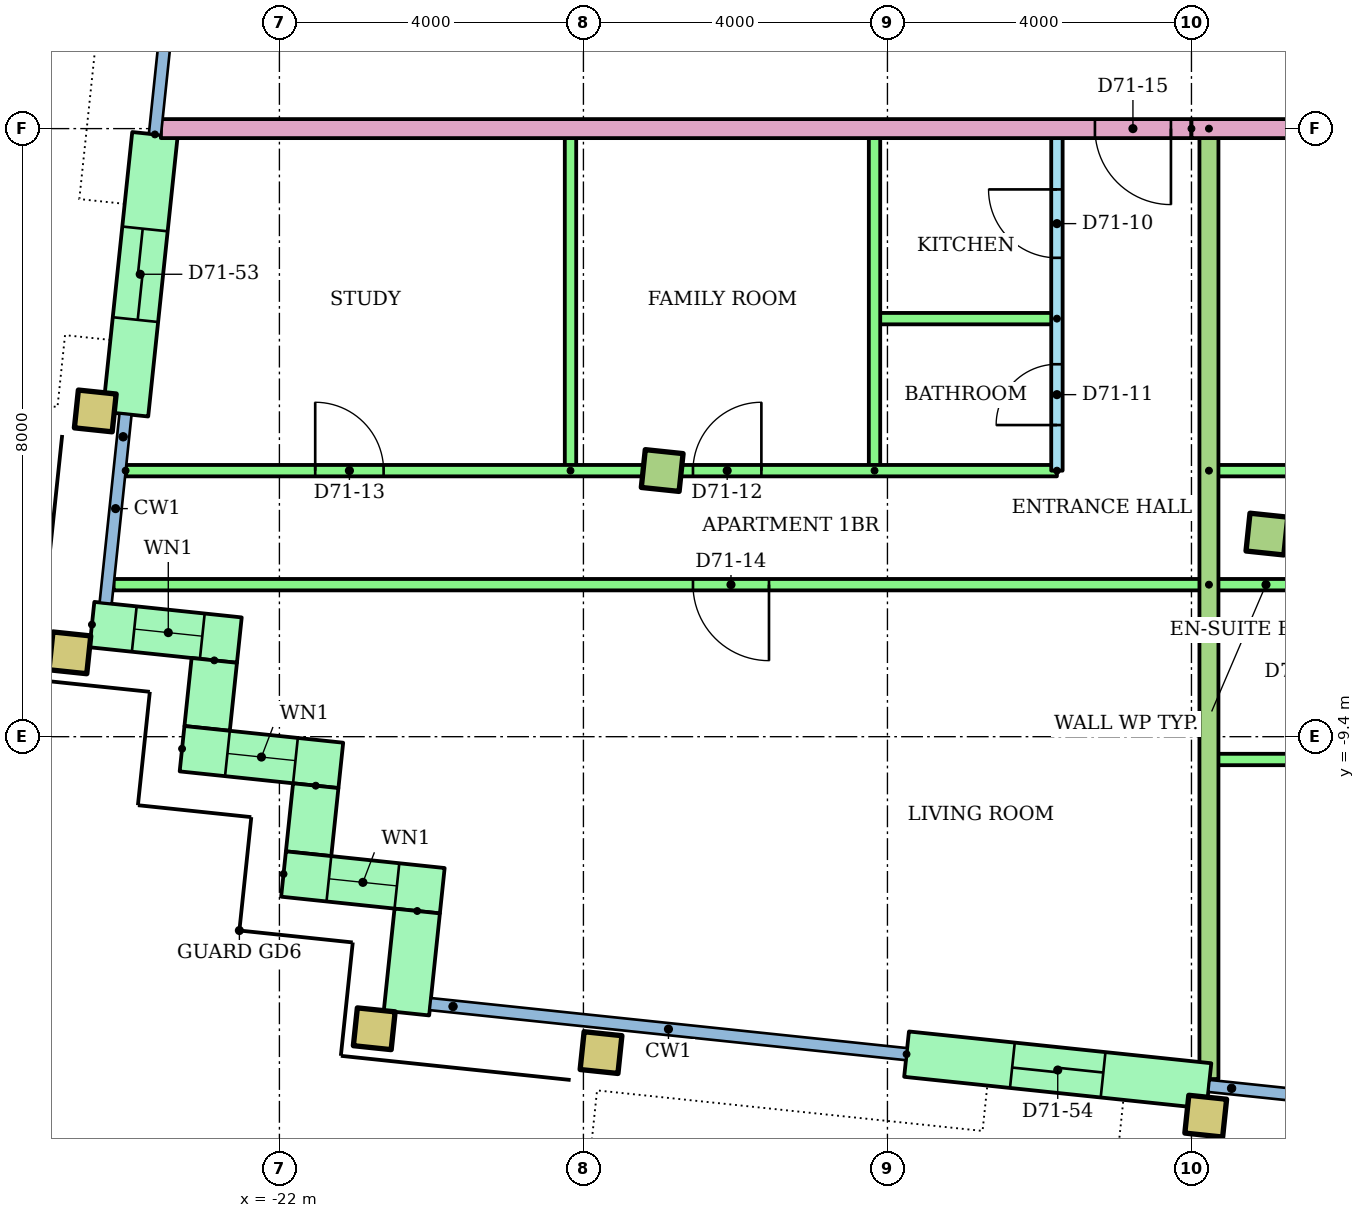
"""IFC4 building model, lengths in metres.
Left out: names, types, materials, properties, quantities, classifications, styles, units other than length and angle.
Written with IfcOpenShell. Run it as: python <this file> out.ifc"""

import sys

from ifc_helpers import new_model, si_unit, direction, frame, frame_2d, origin, origin_2d, place, context, subcontext, project, spatial, rectangle, hollow_rectangle, extrude, element, fill, save


model = new_model("IFC4")
c1 = context("Model", 3, precision=1e-05, world=origin(), true_north=direction((0.0, 1.0)))
c2 = subcontext(c1, "Body", "Model", "MODEL_VIEW")
j1 = project(units=[si_unit("LENGTHUNIT", "METRE"), si_unit("PLANEANGLEUNIT", "RADIAN")], contexts=[c1])
p1 = place(None, origin())
s1 = spatial("IfcSite", under=j1, at=p1, CompositionType="ELEMENT")
p2 = place(p1, origin())
s2 = spatial("IfcBuilding", under=s1, at=p2, CompositionType="ELEMENT")
p3 = place(p2, frame((0.0, 0.0, 272.3)))
s3 = spatial("IfcBuildingStorey", under=s2, at=p3, CompositionType="ELEMENT", Elevation=272.3)
for number, where, z_axis, x_axis in (
    (1, (-20.752, -13.243, 0.0), (0.0, 0.0, 1.0), (0.995, -0.105, 0.0)),
    (2, (-17.768, -13.556, 0.0), (0.0, 0.0, 1.0), (0.995, -0.105, 0.0)),
    (3, (-9.812, -14.392, 0.0), (0.0, 0.0, 1.0), (0.995, -0.105, 0.0)),
    (4, (-24.757, -8.297, 0.0), (0.0, 0.0, 1.0), (0.995, -0.105, 0.0)),
    (5, (-24.423, -5.115, 0.0), (0.0, 0.0, 1.0), (0.995, -0.105, 0.0)),
):
    element("IfcColumn", number, at=place(p3, frame(where, z_axis=z_axis, x_axis=x_axis)), inside=s3, PredefinedType="COLUMN", context=c2, shape_type="SweptSolid", body=[
        extrude(hollow_rectangle(XDim=0.5, YDim=0.5, WallThickness=0.025, at=origin_2d()), origin(), (0.0, 0.0, 1.0), 3.2),
    ])
for number, where, z_axis, x_axis in (
    (6, (-16.964, -5.898, 0.0), (0.0, 0.0, 1.0), (0.995, -0.105, 0.0)),
    (7, (-9.007, -6.735, 0.0), (0.0, 0.0, 1.0), (0.995, -0.105, 0.0)),
):
    element("IfcColumn", number, at=place(p3, frame(where, z_axis=z_axis, x_axis=x_axis)), inside=s3, PredefinedType="COLUMN", context=c2, shape_type="SweptSolid", body=[
        extrude(rectangle(XDim=0.5, YDim=0.5, at=origin_2d()), origin(), (0.0, 0.0, 1.0), 3.2),
    ])
p4 = place(p3, frame((-23.638, -1.476, 0.0), z_axis=(0.0, 0.0, 1.0), x_axis=(-0.104513052986, -0.994523514933, 0.0)))
e8 = element("IfcWall", 8, at=p4, inside=s3, PredefinedType="STANDARD", context=c2, shape_type="SweptSolid", body=[
    extrude(rectangle(XDim=3.7, YDim=0.6, at=frame_2d((1.85, 0.0))), origin(), (0.0, 0.0, 1.0), 2.92),
])
p5 = place(p4, frame((1.25, 0.0, 0.0)))
e9 = element("IfcOpeningElement", 9, at=p5, cuts=e8, PredefinedType="OPENING", context=c2, shape_type="SweptSolid", body=[
    extrude(rectangle(XDim=1.2, YDim=2.1, at=frame_2d((0.6, 1.05))), frame((0.0, 0.31, 0.0), z_axis=(0.0, -1.0, 0.0), x_axis=(1.0, 0.0, 0.0)), (0.0, 0.0, 1.0), 0.62),
])
p6 = place(p3, frame((-24.467, -7.925, 0.0), z_axis=(0.0, 0.0, 1.0), x_axis=(0.994521219184, -0.104534896528, 0.0)))
e10 = element("IfcWall", 10, at=p6, inside=s3, PredefinedType="STANDARD", context=c2, shape_type="SweptSolid", body=[
    extrude(rectangle(XDim=1.95, YDim=0.6, at=frame_2d((0.975, 0.0))), origin(), (0.0, 0.0, 1.0), 2.92),
])
p7 = place(p6, frame((0.56, 0.0, 0.9)))
e11 = element("IfcOpeningElement", 11, at=p7, cuts=e10, PredefinedType="OPENING", context=c2, shape_type="SweptSolid", body=[
    extrude(rectangle(XDim=0.9, YDim=1.5, at=frame_2d((0.45, 0.75))), frame((0.0, 0.31, 0.0), z_axis=(0.0, -1.0, 0.0), x_axis=(1.0, 0.0, 0.0)), (0.0, 0.0, 1.0), 0.62),
])
p8 = place(p3, frame((-22.857, -8.396, 0.0), z_axis=(0.0, 0.0, 1.0), x_axis=(-0.104444712852, -0.994530694326, 0.0)))
e12 = element("IfcWall", 12, at=p8, inside=s3, PredefinedType="STANDARD", context=c2, shape_type="SweptSolid", body=[
    extrude(rectangle(XDim=0.9, YDim=0.6, at=frame_2d((0.45, 0.0))), origin(), (0.0, 0.0, 1.0), 2.92),
])
p9 = place(p3, frame((-23.281, -9.558, 0.0), z_axis=(0.0, 0.0, 1.0), x_axis=(0.994523910136, -0.104509292252, 0.0)))
e13 = element("IfcWall", 13, at=p9, inside=s3, PredefinedType="STANDARD", context=c2, shape_type="SweptSolid", body=[
    extrude(rectangle(XDim=2.1, YDim=0.6, at=frame_2d((1.05, 0.0))), origin(), (0.0, 0.0, 1.0), 2.92),
])
p10 = place(p9, frame((0.6, 0.0, 0.9)))
e14 = element("IfcOpeningElement", 14, at=p10, cuts=e13, PredefinedType="OPENING", context=c2, shape_type="SweptSolid", body=[
    extrude(rectangle(XDim=0.9, YDim=1.5, at=frame_2d((0.45, 0.75))), frame((0.0, 0.31, 0.0), z_axis=(0.0, -1.0, 0.0), x_axis=(1.0, 0.0, 0.0)), (0.0, 0.0, 1.0), 0.62),
])
p11 = place(p3, frame((-21.522, -10.044, 0.0), z_axis=(0.0, 0.0, 1.0), x_axis=(-0.104416541099, -0.994533652495, 0.0)))
e15 = element("IfcWall", 15, at=p11, inside=s3, PredefinedType="STANDARD", context=c2, shape_type="SweptSolid", body=[
    extrude(rectangle(XDim=0.9, YDim=0.6, at=frame_2d((0.45, 0.0))), origin(), (0.0, 0.0, 1.0), 2.92),
])
p12 = place(p3, frame((-21.946, -11.207, 0.0), z_axis=(0.0, 0.0, 1.0), x_axis=(0.994511820899, -0.104624271047, 0.0)))
e16 = element("IfcWall", 16, at=p12, inside=s3, PredefinedType="STANDARD", context=c2, shape_type="SweptSolid", body=[
    extrude(rectangle(XDim=2.1, YDim=0.6, at=frame_2d((1.05, 0.0))), origin(), (0.0, 0.0, 1.0), 2.92),
])
p13 = place(p12, frame((0.6, 0.0, 0.9)))
e17 = element("IfcOpeningElement", 17, at=p13, cuts=e16, PredefinedType="OPENING", context=c2, shape_type="SweptSolid", body=[
    extrude(rectangle(XDim=0.9, YDim=1.5, at=frame_2d((0.45, 0.75))), frame((0.0, 0.31, 0.0), z_axis=(0.0, -1.0, 0.0), x_axis=(1.0, 0.0, 0.0)), (0.0, 0.0, 1.0), 0.62),
])
p14 = place(p3, frame((-20.187, -11.693, 0.0), z_axis=(0.0, 0.0, 1.0), x_axis=(-0.1043365026, -0.994542052517, 0.0)))
e18 = element("IfcWall", 18, at=p14, inside=s3, PredefinedType="STANDARD", context=c2, shape_type="SweptSolid", body=[
    extrude(rectangle(XDim=1.35, YDim=0.6, at=frame_2d((0.675, 0.0))), origin(), (0.0, 0.0, 1.0), 2.92),
])
p15 = place(p3, frame((-13.749, -13.576, 0.0), z_axis=(0.0, 0.0, 1.0), x_axis=(0.994519156568, -0.104554517933, 0.0)))
e19 = element("IfcWall", 19, at=p15, inside=s3, PredefinedType="STANDARD", context=c2, shape_type="SweptSolid", body=[
    extrude(rectangle(XDim=4.0, YDim=0.6, at=frame_2d((2.0, 0.0))), origin(), (0.0, 0.0, 1.0), 2.92),
])
p16 = place(p15, frame((1.4, 0.0, 0.0)))
e20 = element("IfcOpeningElement", 20, at=p16, cuts=e19, PredefinedType="OPENING", context=c2, shape_type="SweptSolid", body=[
    extrude(rectangle(XDim=1.2, YDim=2.1, at=frame_2d((0.6, 1.05))), frame((0.0, 0.31, 0.0), z_axis=(0.0, -1.0, 0.0), x_axis=(1.0, 0.0, 0.0)), (0.0, 0.0, 1.0), 0.62),
])
p17 = place(p3, frame((-11.77, -5.9, 0.0), z_axis=(0.0, 0.0, 1.0), x_axis=(0.0, 1.0, 0.0)))
e21 = element("IfcWall", 21, at=p17, inside=s3, PredefinedType="PARTITIONING", context=c2, shape_type="SweptSolid", body=[
    extrude(rectangle(XDim=4.5, YDim=0.15, at=frame_2d((2.25, 0.0))), origin(), (0.0, 0.0, 1.0), 2.4),
])
p18 = place(p17, frame((2.8, 0.0, 0.0)))
e22 = element("IfcOpeningElement", 22, at=p18, cuts=e21, PredefinedType="OPENING", context=c2, shape_type="SweptSolid", body=[
    extrude(rectangle(XDim=0.9, YDim=2.1, at=frame_2d((0.45, 1.05))), frame((0.0, 0.085, 0.0), z_axis=(0.0, -1.0, 0.0), x_axis=(1.0, 0.0, 0.0)), (0.0, 0.0, 1.0), 0.17),
])
p19 = place(p17, frame((0.6, 0.0, 0.0)))
e23 = element("IfcOpeningElement", 23, at=p19, cuts=e21, PredefinedType="OPENING", context=c2, shape_type="SweptSolid", body=[
    extrude(rectangle(XDim=0.8, YDim=2.1, at=frame_2d((0.4, 1.05))), frame((0.0, 0.085, 0.0), z_axis=(0.0, -1.0, 0.0), x_axis=(1.0, 0.0, 0.0)), (0.0, 0.0, 1.0), 0.17),
])
p20 = place(p3, frame((-11.77, -3.9, 0.0), z_axis=(0.0, 0.0, 1.0), x_axis=(-1.0, 0.0, 0.0)))
e24 = element("IfcWall", 24, at=p20, inside=s3, PredefinedType="PARTITIONING", context=c2, shape_type="SweptSolid", body=[
    extrude(rectangle(XDim=2.4, YDim=0.15, at=frame_2d((1.2, 0.0))), origin(), (0.0, 0.0, 1.0), 2.4),
])
for number, where, z_axis, x_axis in (
    (25, (-14.17, -5.9, 0.0), (0.0, 0.0, 1.0), (0.0, 1.0, 0.0)),
    (26, (-18.17, -5.9, 0.0), (0.0, 0.0, 1.0), (0.0, 1.0, 0.0)),
):
    element("IfcWall", number, at=place(p3, frame(where, z_axis=z_axis, x_axis=x_axis)), inside=s3, PredefinedType="PARTITIONING", context=c2, shape_type="SweptSolid", body=[
        extrude(rectangle(XDim=4.5, YDim=0.15, at=frame_2d((2.25, 0.0))), origin(), (0.0, 0.0, 1.0), 2.4),
    ])
p21 = place(p3, frame((-24.023, -5.9, 0.0)))
e27 = element("IfcWall", 27, at=p21, inside=s3, PredefinedType="PARTITIONING", context=c2, shape_type="SweptSolid", body=[
    extrude(rectangle(XDim=12.253, YDim=0.15, at=frame_2d((6.127, 0.0))), origin(), (0.0, 0.0, 1.0), 2.4),
])
p22 = place(p21, frame((7.465, 0.0, 0.0)))
e28 = element("IfcOpeningElement", 28, at=p22, cuts=e27, PredefinedType="OPENING", context=c2, shape_type="SweptSolid", body=[
    extrude(rectangle(XDim=0.9, YDim=2.1, at=frame_2d((0.45, 1.05))), frame((0.0, 0.085, 0.0), z_axis=(0.0, -1.0, 0.0), x_axis=(1.0, 0.0, 0.0)), (0.0, 0.0, 1.0), 0.17),
])
p23 = place(p21, frame((2.494, 0.0, 0.0)))
e29 = element("IfcOpeningElement", 29, at=p23, cuts=e27, PredefinedType="OPENING", context=c2, shape_type="SweptSolid", body=[
    extrude(rectangle(XDim=0.9, YDim=2.1, at=frame_2d((0.45, 1.05))), frame((0.0, 0.085, 0.0), z_axis=(0.0, -1.0, 0.0), x_axis=(1.0, 0.0, 0.0)), (0.0, 0.0, 1.0), 0.17),
])
p24 = place(p3, frame((-9.77, -7.4, 0.0), z_axis=(0.0, 0.0, 1.0), x_axis=(-1.0, 0.0, 0.0)))
e30 = element("IfcWall", 30, at=p24, inside=s3, PredefinedType="PARTITIONING", context=c2, shape_type="SweptSolid", body=[
    extrude(rectangle(XDim=14.411, YDim=0.15, at=frame_2d((7.206, 0.0))), origin(), (0.0, 0.0, 1.0), 2.4),
])
p25 = place(p24, frame((5.789, 0.0, 0.0)))
e31 = element("IfcOpeningElement", 31, at=p25, cuts=e30, PredefinedType="OPENING", context=c2, shape_type="SweptSolid", body=[
    extrude(rectangle(XDim=1.0, YDim=2.1, at=frame_2d((0.5, 1.05))), frame((0.0, 0.085, 0.0), z_axis=(0.0, -1.0, 0.0), x_axis=(1.0, 0.0, 0.0)), (0.0, 0.0, 1.0), 0.17),
])
p26 = place(p3, frame((-9.77, -5.9, 0.0)))
e32 = element("IfcWall", 32, at=p26, inside=s3, PredefinedType="PARTITIONING", context=c2, shape_type="SweptSolid", body=[
    extrude(rectangle(XDim=13.912, YDim=0.15, at=frame_2d((6.956, 0.0))), origin(), (0.0, 0.0, 1.0), 2.4),
])
p27 = place(p26, frame((9.562, 0.0, 0.0)))
e33 = element("IfcOpeningElement", 33, at=p27, cuts=e32, PredefinedType="OPENING", context=c2, shape_type="SweptSolid", body=[
    extrude(rectangle(XDim=0.9, YDim=2.1, at=frame_2d((0.45, 1.05))), frame((0.0, 0.085, 0.0), z_axis=(0.0, -1.0, 0.0), x_axis=(1.0, 0.0, 0.0)), (0.0, 0.0, 1.0), 0.17),
])
p28 = place(p26, frame((6.187, 0.0, 0.0)))
e34 = element("IfcOpeningElement", 34, at=p28, cuts=e32, PredefinedType="OPENING", context=c2, shape_type="SweptSolid", body=[
    extrude(rectangle(XDim=0.9, YDim=2.1, at=frame_2d((0.45, 1.05))), frame((0.0, 0.085, 0.0), z_axis=(0.0, -1.0, 0.0), x_axis=(1.0, 0.0, 0.0)), (0.0, 0.0, 1.0), 0.17),
])
p29 = place(p26, frame((1.931, 0.0, 0.0)))
e35 = element("IfcOpeningElement", 35, at=p29, cuts=e32, PredefinedType="OPENING", context=c2, shape_type="SweptSolid", body=[
    extrude(rectangle(XDim=0.9, YDim=2.1, at=frame_2d((0.45, 1.05))), frame((0.0, 0.085, 0.0), z_axis=(0.0, -1.0, 0.0), x_axis=(1.0, 0.0, 0.0)), (0.0, 0.0, 1.0), 0.17),
])
p30 = place(p3, frame((6.142, -7.4, 0.0), z_axis=(0.0, 0.0, 1.0), x_axis=(-1.0, 0.0, 0.0)))
e36 = element("IfcWall", 36, at=p30, inside=s3, PredefinedType="PARTITIONING", context=c2, shape_type="SweptSolid", body=[
    extrude(rectangle(XDim=15.912, YDim=0.15, at=frame_2d((7.956, 0.0))), origin(), (0.0, 0.0, 1.0), 2.4),
])
p31 = place(p30, frame((12.252, 0.0, 0.0)))
e37 = element("IfcOpeningElement", 37, at=p31, cuts=e36, PredefinedType="OPENING", context=c2, shape_type="SweptSolid", body=[
    extrude(rectangle(XDim=0.9, YDim=2.1, at=frame_2d((0.45, 1.05))), frame((0.0, 0.085, 0.0), z_axis=(0.0, -1.0, 0.0), x_axis=(1.0, 0.0, 0.0)), (0.0, 0.0, 1.0), 0.17),
])
p32 = place(p30, frame((9.495, 0.0, 0.0)))
e38 = element("IfcOpeningElement", 38, at=p32, cuts=e36, PredefinedType="OPENING", context=c2, shape_type="SweptSolid", body=[
    extrude(rectangle(XDim=0.9, YDim=2.1, at=frame_2d((0.45, 1.05))), frame((0.0, 0.085, 0.0), z_axis=(0.0, -1.0, 0.0), x_axis=(1.0, 0.0, 0.0)), (0.0, 0.0, 1.0), 0.17),
])
p33 = place(p30, frame((3.478, 0.0, 0.0)))
e39 = element("IfcOpeningElement", 39, at=p33, cuts=e36, PredefinedType="OPENING", context=c2, shape_type="SweptSolid", body=[
    extrude(rectangle(XDim=1.0, YDim=2.1, at=frame_2d((0.5, 1.05))), frame((0.0, 0.085, 0.0), z_axis=(0.0, -1.0, 0.0), x_axis=(1.0, 0.0, 0.0)), (0.0, 0.0, 1.0), 0.17),
])
p34 = place(p3, frame((-7.77, -9.7, 0.0), z_axis=(0.0, 0.0, 1.0), x_axis=(-1.0, 0.0, 0.0)))
e40 = element("IfcWall", 40, at=p34, inside=s3, PredefinedType="PARTITIONING", context=c2, shape_type="SweptSolid", body=[
    extrude(rectangle(XDim=2.0, YDim=0.15, at=frame_2d((1.0, 0.0))), origin(), (0.0, 0.0, 1.0), 2.4),
])
p35 = place(p3, frame((-9.77, -1.4, 0.0), z_axis=(0.0, 0.0, 1.0), x_axis=(0.0, -1.0, 0.0)))
e41 = element("IfcWall", 41, at=p35, inside=s3, PredefinedType="PARTITIONING", context=c2, shape_type="SweptSolid", body=[
    extrude(rectangle(XDim=12.504, YDim=0.25, at=frame_2d((6.252, 0.0))), origin(), (0.0, 0.0, 1.0), 2.4),
])
p36 = place(p3, frame((-10.0, -1.4, 0.0), z_axis=(0.0, 0.0, 1.0), x_axis=(-1.0, 0.0, 0.0)))
e42 = element("IfcWall", 42, at=p36, inside=s3, PredefinedType="PARTITIONING", context=c2, shape_type="SweptSolid", body=[
    extrude(rectangle(XDim=13.56, YDim=0.25, at=frame_2d((6.78, 0.0))), origin(), (0.0, 0.0, 1.0), 2.4),
])
p37 = place(p36, frame((0.27, 0.0, 0.0)))
e43 = element("IfcOpeningElement", 43, at=p37, cuts=e42, PredefinedType="OPENING", context=c2, shape_type="SweptSolid", body=[
    extrude(rectangle(XDim=1.0, YDim=2.1, at=frame_2d((0.5, 1.05))), frame((0.0, 0.135, 0.0), z_axis=(0.0, -1.0, 0.0), x_axis=(1.0, 0.0, 0.0)), (0.0, 0.0, 1.0), 0.27),
])
p38 = place(p3, frame((10.0, -1.4, 0.0), z_axis=(0.0, 0.0, 1.0), x_axis=(-1.0, 0.0, 0.0)))
e44 = element("IfcWall", 44, at=p38, inside=s3, PredefinedType="PARTITIONING", context=c2, shape_type="SweptSolid", body=[
    extrude(rectangle(XDim=20.0, YDim=0.25, at=frame_2d((10.0, 0.0))), origin(), (0.0, 0.0, 1.0), 2.4),
])
p39 = place(p38, frame((4.358, 0.0, 0.0)))
e45 = element("IfcOpeningElement", 45, at=p39, cuts=e44, PredefinedType="OPENING", context=c2, shape_type="SweptSolid", body=[
    extrude(rectangle(XDim=1.0, YDim=2.1, at=frame_2d((0.5, 1.05))), frame((0.0, 0.135, 0.0), z_axis=(0.0, -1.0, 0.0), x_axis=(1.0, 0.0, 0.0)), (0.0, 0.0, 1.0), 0.27),
])
p40 = place(p38, frame((2.614, 0.0, 0.0)))
e46 = element("IfcOpeningElement", 46, at=p40, cuts=e44, PredefinedType="OPENING", context=c2, shape_type="SweptSolid", body=[
    extrude(rectangle(XDim=0.9, YDim=2.1, at=frame_2d((0.45, 1.05))), frame((0.0, 0.135, 0.0), z_axis=(0.0, -1.0, 0.0), x_axis=(1.0, 0.0, 0.0)), (0.0, 0.0, 1.0), 0.27),
])
p41 = place(p7, origin())
e47 = element("IfcWindow", 47, at=p41, inside=s3, PartitioningType="SINGLE_PANEL", PredefinedType="WINDOW", context=c2, shape_type="SweptSolid", body=[
    extrude(rectangle(XDim=0.9, YDim=1.5, at=frame_2d((0.45, 0.75))), frame((0.0, 0.03, 0.0), z_axis=(0.0, -1.0, 0.0), x_axis=(1.0, 0.0, 0.0)), (0.0, 0.0, 1.0), 0.06),
])
fill(e11, e47)
p42 = place(p10, origin())
e48 = element("IfcWindow", 48, at=p42, inside=s3, PartitioningType="SINGLE_PANEL", PredefinedType="WINDOW", context=c2, shape_type="SweptSolid", body=[
    extrude(rectangle(XDim=0.9, YDim=1.5, at=frame_2d((0.45, 0.75))), frame((0.0, 0.03, 0.0), z_axis=(0.0, -1.0, 0.0), x_axis=(1.0, 0.0, 0.0)), (0.0, 0.0, 1.0), 0.06),
])
fill(e14, e48)
p43 = place(p13, origin())
e49 = element("IfcWindow", 49, at=p43, inside=s3, PartitioningType="SINGLE_PANEL", PredefinedType="WINDOW", context=c2, shape_type="SweptSolid", body=[
    extrude(rectangle(XDim=0.9, YDim=1.5, at=frame_2d((0.45, 0.75))), frame((0.0, 0.03, 0.0), z_axis=(0.0, -1.0, 0.0), x_axis=(1.0, 0.0, 0.0)), (0.0, 0.0, 1.0), 0.06),
])
fill(e17, e49)
p44 = place(p18, origin())
e50 = element("IfcDoor", 50, at=p44, inside=s3, OperationType="SINGLE_SWING_RIGHT", PredefinedType="DOOR", context=c2, shape_type="SweptSolid", body=[
    extrude(rectangle(XDim=0.9, YDim=2.1, at=frame_2d((0.45, 1.05))), frame((0.0, 0.025, 0.0), z_axis=(0.0, -1.0, 0.0), x_axis=(1.0, 0.0, 0.0)), (0.0, 0.0, 1.0), 0.05),
])
fill(e22, e50)
p45 = place(p19, origin())
e51 = element("IfcDoor", 51, at=p45, inside=s3, OperationType="SINGLE_SWING_LEFT", PredefinedType="DOOR", context=c2, shape_type="SweptSolid", body=[
    extrude(rectangle(XDim=0.8, YDim=2.1, at=frame_2d((0.4, 1.05))), frame((0.0, 0.025, 0.0), z_axis=(0.0, -1.0, 0.0), x_axis=(1.0, 0.0, 0.0)), (0.0, 0.0, 1.0), 0.05),
])
fill(e23, e51)
p46 = place(p22, origin())
e52 = element("IfcDoor", 52, at=p46, inside=s3, OperationType="SINGLE_SWING_RIGHT", PredefinedType="DOOR", context=c2, shape_type="SweptSolid", body=[
    extrude(rectangle(XDim=0.9, YDim=2.1, at=frame_2d((0.45, 1.05))), frame((0.0, 0.025, 0.0), z_axis=(0.0, -1.0, 0.0), x_axis=(1.0, 0.0, 0.0)), (0.0, 0.0, 1.0), 0.05),
])
fill(e28, e52)
p47 = place(p23, origin())
e53 = element("IfcDoor", 53, at=p47, inside=s3, OperationType="SINGLE_SWING_LEFT", PredefinedType="DOOR", context=c2, shape_type="SweptSolid", body=[
    extrude(rectangle(XDim=0.9, YDim=2.1, at=frame_2d((0.45, 1.05))), frame((0.0, 0.025, 0.0), z_axis=(0.0, -1.0, 0.0), x_axis=(1.0, 0.0, 0.0)), (0.0, 0.0, 1.0), 0.05),
])
fill(e29, e53)
p48 = place(p25, origin())
e54 = element("IfcDoor", 54, at=p48, inside=s3, OperationType="SINGLE_SWING_LEFT", PredefinedType="DOOR", context=c2, shape_type="SweptSolid", body=[
    extrude(rectangle(XDim=1.0, YDim=2.1, at=frame_2d((0.5, 1.05))), frame((0.0, 0.025, 0.0), z_axis=(0.0, -1.0, 0.0), x_axis=(1.0, 0.0, 0.0)), (0.0, 0.0, 1.0), 0.05),
])
fill(e31, e54)
p49 = place(p37, origin())
e55 = element("IfcDoor", 55, at=p49, inside=s3, OperationType="SINGLE_SWING_LEFT", PredefinedType="DOOR", context=c2, shape_type="SweptSolid", body=[
    extrude(rectangle(XDim=1.0, YDim=2.1, at=frame_2d((0.5, 1.05))), frame((0.0, 0.025, 0.0), z_axis=(0.0, -1.0, 0.0), x_axis=(1.0, 0.0, 0.0)), (0.0, 0.0, 1.0), 0.05),
])
fill(e43, e55)
p50 = place(p5, origin())
e56 = element("IfcDoor", 56, at=p50, inside=s3, OperationType="SLIDING_TO_LEFT", PredefinedType="DOOR", context=c2, shape_type="SweptSolid", body=[
    extrude(rectangle(XDim=1.2, YDim=2.1, at=frame_2d((0.6, 1.05))), frame((0.0, 0.025, 0.0), z_axis=(0.0, -1.0, 0.0), x_axis=(1.0, 0.0, 0.0)), (0.0, 0.0, 1.0), 0.05),
])
fill(e9, e56)
p51 = place(p16, origin())
e57 = element("IfcDoor", 57, at=p51, inside=s3, OperationType="SLIDING_TO_LEFT", PredefinedType="DOOR", context=c2, shape_type="SweptSolid", body=[
    extrude(rectangle(XDim=1.2, YDim=2.1, at=frame_2d((0.6, 1.05))), frame((0.0, 0.025, 0.0), z_axis=(0.0, -1.0, 0.0), x_axis=(1.0, 0.0, 0.0)), (0.0, 0.0, 1.0), 0.05),
])
fill(e20, e57)
save(model, sys.argv[1])
